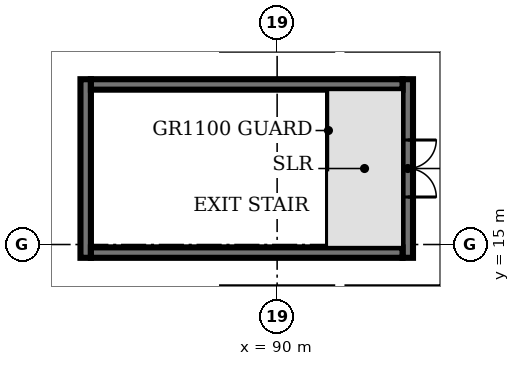
"""IFC4 building model, lengths in metres.
Left out: names, types, materials, properties, quantities, classifications, styles, units other than length and angle.
Written with IfcOpenShell. Run it as: python <this file> out.ifc"""

import sys

from ifc_helpers import new_model, si_unit, direction, frame, frame_2d, origin, place, context, subcontext, project, spatial, rectangle, extrude, element, fill, save


model = new_model("IFC4")
c1 = context("Model", 3, precision=1e-05, world=origin(), true_north=direction((0.0, 1.0)))
c2 = subcontext(c1, "Body", "Model", "MODEL_VIEW")
j1 = project(units=[si_unit("LENGTHUNIT", "METRE"), si_unit("PLANEANGLEUNIT", "RADIAN")], contexts=[c1])
p1 = place(None, origin())
s1 = spatial("IfcSite", under=j1, at=p1, CompositionType="ELEMENT")
p2 = place(p1, origin())
s2 = spatial("IfcBuilding", under=s1, at=p2, CompositionType="ELEMENT")
p3 = place(p2, frame((0.0, 0.0, 11.0)))
s3 = spatial("IfcBuildingStorey", under=s2, at=p3, CompositionType="ELEMENT", Elevation=11.0)
p4 = place(p3, frame((84.962, 14.65, 0.0), z_axis=(0.0, 0.0, 1.0), x_axis=(0.0, 1.0, 0.0)))
e1 = element("IfcWall", 1, at=p4, inside=s3, PredefinedType="SHEAR", context=c2, shape_type="SweptSolid", body=[
    extrude(rectangle(XDim=4.7, YDim=0.275, at=frame_2d((2.35, 0.0))), origin(), (0.0, 0.0, 1.0), 3.0),
])
p5 = place(p3, frame((93.438, 19.35, 0.0), z_axis=(0.0, 0.0, 1.0), x_axis=(0.0, -1.0, 0.0)))
e2 = element("IfcWall", 2, at=p5, inside=s3, PredefinedType="SHEAR", context=c2, shape_type="SweptSolid", body=[
    extrude(rectangle(XDim=4.7, YDim=0.275, at=frame_2d((2.35, 0.0))), origin(), (0.0, 0.0, 1.0), 3.0),
])
p6 = place(p5, frame((1.6, 0.0, 0.0)))
e3 = element("IfcOpeningElement", 3, at=p6, cuts=e2, PredefinedType="OPENING", context=c2, shape_type="SweptSolid", body=[
    extrude(rectangle(XDim=1.5, YDim=2.1, at=frame_2d((0.75, 1.05))), frame((0.0, 0.147, 0.0), z_axis=(0.0, -1.0, 0.0), x_axis=(1.0, 0.0, 0.0)), (0.0, 0.0, 1.0), 0.295),
])
for number, where, z_axis, x_axis in (
    (4, (85.1, 14.788, 0.0), (0.0, 0.0, 1.0), (1.0, 0.0, 0.0)),
    (5, (85.1, 19.212, 0.0), (0.0, 0.0, 1.0), (1.0, 0.0, 0.0)),
):
    element("IfcWall", number, at=place(p3, frame(where, z_axis=z_axis, x_axis=x_axis)), inside=s3, PredefinedType="SHEAR", context=c2, shape_type="SweptSolid", body=[
        extrude(rectangle(XDim=8.2, YDim=0.275, at=frame_2d((4.1, 0.0))), origin(), (0.0, 0.0, 1.0), 3.0),
    ])
p7 = place(p6, origin())
e6 = element("IfcDoor", 6, at=p7, inside=s3, OperationType="DOUBLE_DOOR_SINGLE_SWING", PredefinedType="DOOR", context=c2, shape_type="SweptSolid", body=[
    extrude(rectangle(XDim=1.5, YDim=2.1, at=frame_2d((0.75, 1.05))), frame((0.0, 0.025, 0.0), z_axis=(0.0, -1.0, 0.0), x_axis=(1.0, 0.0, 0.0)), (0.0, 0.0, 1.0), 0.05),
])
fill(e3, e6)
save(model, sys.argv[1])
